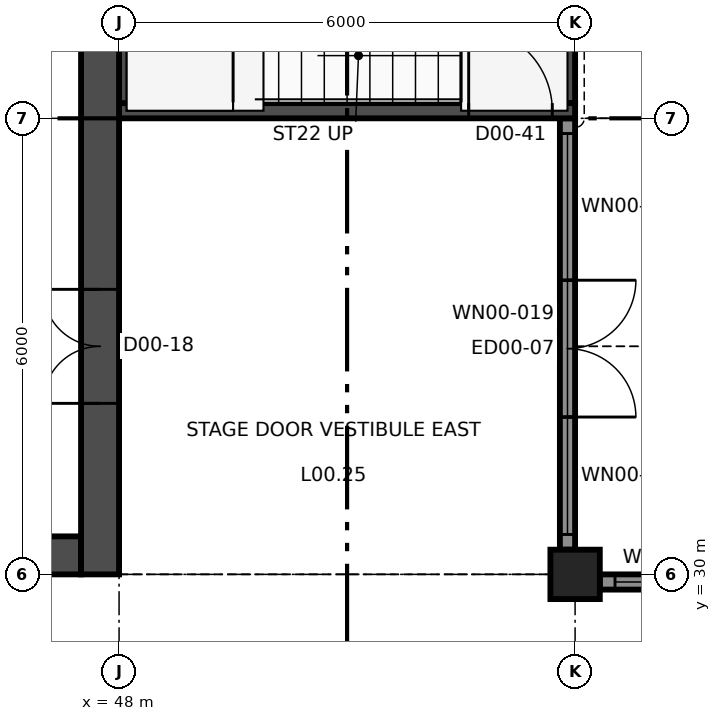
"""IFC4 building model, lengths in metres.
Left out: names, types, materials, properties, quantities, classifications, styles, units other than length and angle.
Written with IfcOpenShell. Run it as: python <this file> out.ifc"""

import sys

from ifc_helpers import new_model, si_unit, direction, frame, frame_2d, origin, origin_2d, place, context, subcontext, project, spatial, rectangle, extrude, element, fill, save


model = new_model("IFC4")
c1 = context("Model", 3, precision=1e-05, world=origin(), true_north=direction((0.0, 1.0)))
c2 = subcontext(c1, "Body", "Model", "MODEL_VIEW")
j1 = project(units=[si_unit("LENGTHUNIT", "METRE"), si_unit("PLANEANGLEUNIT", "RADIAN")], contexts=[c1])
p1 = place(None, origin())
s1 = spatial("IfcSite", under=j1, at=p1, CompositionType="ELEMENT")
p2 = place(p1, origin())
s2 = spatial("IfcBuilding", under=s1, at=p2, CompositionType="ELEMENT")
p3 = place(p2, origin())
s3 = spatial("IfcBuildingStorey", under=s2, at=p3, CompositionType="ELEMENT", Elevation=0.0)
p4 = place(p3, frame((54.0, 30.0, -0.3), z_axis=(0.0, 0.0, 1.0), x_axis=(1.0, 0.0, 0.0)))
e1 = element("IfcColumn", 1, at=p4, inside=s3, PredefinedType="COLUMN", context=c2, shape_type="SweptSolid", body=[
    extrude(rectangle(XDim=0.65, YDim=0.65, at=origin_2d()), origin(), (0.0, 0.0, 1.0), 7.3),
])
p5 = place(p3, frame((48.0, 36.1, -0.3), z_axis=(0.0, 0.0, 1.0), x_axis=(1.0, 0.0, 0.0)))
e2 = element("IfcWall", 2, at=p5, inside=s3, PredefinedType="SHEAR", context=c2, shape_type="SweptSolid", body=[
    extrude(rectangle(XDim=6.0, YDim=0.2, at=frame_2d((3.0, 0.0))), origin(), (0.0, 0.0, 1.0), 7.3),
])
p6 = place(p5, frame((4.6, 0.0, 0.3)))
e3 = element("IfcOpeningElement", 3, at=p6, cuts=e2, PredefinedType="OPENING", context=c2, shape_type="SweptSolid", body=[
    extrude(rectangle(XDim=1.1, YDim=2.2, at=frame_2d((0.55, 1.1))), frame((0.0, 0.11, 0.0), z_axis=(0.0, -1.0, 0.0), x_axis=(1.0, 0.0, 0.0)), (0.0, 0.0, 1.0), 0.22),
])
p7 = place(p3, frame((48.1, 36.2, -0.3), z_axis=(0.0, 0.0, 1.0), x_axis=(0.0, 1.0, 0.0)))
e4 = element("IfcWall", 4, at=p7, inside=s3, PredefinedType="SHEAR", context=c2, shape_type="SweptSolid", body=[
    extrude(rectangle(XDim=5.6, YDim=0.2, at=frame_2d((2.8, 0.0))), origin(), (0.0, 0.0, 1.0), 7.3),
])
p8 = place(p3, frame((53.9, 36.2, -0.3), z_axis=(0.0, 0.0, 1.0), x_axis=(0.0, 1.0, 0.0)))
e5 = element("IfcWall", 5, at=p8, inside=s3, PredefinedType="SHEAR", context=c2, shape_type="SweptSolid", body=[
    extrude(rectangle(XDim=5.6, YDim=0.2, at=frame_2d((2.8, 0.0))), origin(), (0.0, 0.0, 1.0), 7.3),
])
p9 = place(p8, frame((1.9, 0.0, 0.3)))
e6 = element("IfcOpeningElement", 6, at=p9, cuts=e5, PredefinedType="OPENING", context=c2, shape_type="SweptSolid", body=[
    extrude(rectangle(XDim=1.8, YDim=2.4, at=frame_2d((0.9, 1.2))), frame((0.0, 0.11, 0.0), z_axis=(0.0, -1.0, 0.0), x_axis=(1.0, 0.0, 0.0)), (0.0, 0.0, 1.0), 0.22),
])
p10 = place(p3, frame((47.75, 30.0, -0.3), z_axis=(0.0, 0.0, 1.0), x_axis=(0.0, 1.0, 0.0)))
e7 = element("IfcWall", 7, at=p10, inside=s3, PredefinedType="SHEAR", context=c2, shape_type="SweptSolid", body=[
    extrude(rectangle(XDim=24.0, YDim=0.5, at=frame_2d((12.0, 0.0))), origin(), (0.0, 0.0, 1.0), 7.3),
])
p11 = place(p10, frame((2.25, 0.0, 0.3)))
e8 = element("IfcOpeningElement", 8, at=p11, cuts=e7, PredefinedType="OPENING", context=c2, shape_type="SweptSolid", body=[
    extrude(rectangle(XDim=1.5, YDim=2.1, at=frame_2d((0.75, 1.05))), frame((0.0, 0.26, 0.0), z_axis=(0.0, -1.0, 0.0), x_axis=(1.0, 0.0, 0.0)), (0.0, 0.0, 1.0), 0.52),
])
p12 = place(p10, frame((22.3, 0.0, 0.3)))
e9 = element("IfcOpeningElement", 9, at=p12, cuts=e7, PredefinedType="OPENING", context=c2, shape_type="SweptSolid", body=[
    extrude(rectangle(XDim=1.0, YDim=2.1, at=frame_2d((0.5, 1.05))), frame((0.0, 0.26, 0.0), z_axis=(0.0, -1.0, 0.0), x_axis=(1.0, 0.0, 0.0)), (0.0, 0.0, 1.0), 0.52),
])
p13 = place(p3, frame((18.5, 30.25, -0.3), z_axis=(0.0, 0.0, 1.0), x_axis=(1.0, 0.0, 0.0)))
e10 = element("IfcWall", 10, at=p13, inside=s3, PredefinedType="SHEAR", context=c2, shape_type="SweptSolid", body=[
    extrude(rectangle(XDim=29.0, YDim=0.5, at=frame_2d((14.5, 0.0))), origin(), (0.0, 0.0, 1.0), 7.3),
])
p14 = place(p3, frame((53.9, 36.0, 0.0), z_axis=(0.0, 0.0, 1.0), x_axis=(0.0, -1.0, 0.0)))
e11 = element("IfcWall", 11, at=p14, inside=s3, PredefinedType="SOLIDWALL", context=c2, shape_type="SweptSolid", body=[
    extrude(rectangle(XDim=5.675, YDim=0.2, at=frame_2d((2.837, 0.0))), origin(), (0.0, 0.0, 1.0), 6.05),
])
p15 = place(p14, frame((2.13, 0.0, 0.0)))
e12 = element("IfcOpeningElement", 12, at=p15, cuts=e11, PredefinedType="OPENING", context=c2, shape_type="SweptSolid", body=[
    extrude(rectangle(XDim=1.8, YDim=2.4, at=frame_2d((0.9, 1.2))), frame((0.0, 0.11, 0.0), z_axis=(0.0, -1.0, 0.0), x_axis=(1.0, 0.0, 0.0)), (0.0, 0.0, 1.0), 0.22),
])
p16 = place(p14, frame((2.13, 0.0, 2.5)))
e13 = element("IfcOpeningElement", 13, at=p16, cuts=e11, PredefinedType="OPENING", context=c2, shape_type="SweptSolid", body=[
    extrude(rectangle(XDim=1.8, YDim=3.2, at=frame_2d((0.9, 1.6))), frame((0.0, 0.11, 0.0), z_axis=(0.0, -1.0, 0.0), x_axis=(1.0, 0.0, 0.0)), (0.0, 0.0, 1.0), 0.22),
])
p17 = place(p14, frame((0.2, 0.0, 0.1)))
e14 = element("IfcOpeningElement", 14, at=p17, cuts=e11, PredefinedType="OPENING", context=c2, shape_type="SweptSolid", body=[
    extrude(rectangle(XDim=1.93, YDim=5.6, at=frame_2d((0.965, 2.8))), frame((0.0, 0.11, 0.0), z_axis=(0.0, -1.0, 0.0), x_axis=(1.0, 0.0, 0.0)), (0.0, 0.0, 1.0), 0.22),
])
p18 = place(p14, frame((3.93, 0.0, 0.1)))
e15 = element("IfcOpeningElement", 15, at=p18, cuts=e11, PredefinedType="OPENING", context=c2, shape_type="SweptSolid", body=[
    extrude(rectangle(XDim=1.545, YDim=5.6, at=frame_2d((0.772, 2.8))), frame((0.0, 0.11, 0.0), z_axis=(0.0, -1.0, 0.0), x_axis=(1.0, 0.0, 0.0)), (0.0, 0.0, 1.0), 0.22),
])
p19 = place(p3, frame((54.325, 29.9, 0.0), z_axis=(0.0, 0.0, 1.0), x_axis=(1.0, 0.0, 0.0)))
e16 = element("IfcWall", 16, at=p19, inside=s3, PredefinedType="SOLIDWALL", context=c2, shape_type="SweptSolid", body=[
    extrude(rectangle(XDim=5.675, YDim=0.2, at=frame_2d((2.837, 0.0))), origin(), (0.0, 0.0, 1.0), 6.05),
])
p20 = place(p19, frame((1.745, 0.0, 0.0)))
e17 = element("IfcOpeningElement", 17, at=p20, cuts=e16, PredefinedType="OPENING", context=c2, shape_type="SweptSolid", body=[
    extrude(rectangle(XDim=1.8, YDim=2.4, at=frame_2d((0.9, 1.2))), frame((0.0, 0.11, 0.0), z_axis=(0.0, -1.0, 0.0), x_axis=(1.0, 0.0, 0.0)), (0.0, 0.0, 1.0), 0.22),
])
p21 = place(p19, frame((1.745, 0.0, 2.5)))
e18 = element("IfcOpeningElement", 18, at=p21, cuts=e16, PredefinedType="OPENING", context=c2, shape_type="SweptSolid", body=[
    extrude(rectangle(XDim=1.8, YDim=3.2, at=frame_2d((0.9, 1.6))), frame((0.0, 0.11, 0.0), z_axis=(0.0, -1.0, 0.0), x_axis=(1.0, 0.0, 0.0)), (0.0, 0.0, 1.0), 0.22),
])
p22 = place(p19, frame((0.2, 0.0, 0.1)))
e19 = element("IfcOpeningElement", 19, at=p22, cuts=e16, PredefinedType="OPENING", context=c2, shape_type="SweptSolid", body=[
    extrude(rectangle(XDim=1.545, YDim=5.6, at=frame_2d((0.772, 2.8))), frame((0.0, 0.11, 0.0), z_axis=(0.0, -1.0, 0.0), x_axis=(1.0, 0.0, 0.0)), (0.0, 0.0, 1.0), 0.22),
])
p23 = place(p19, frame((3.545, 0.0, 0.1)))
e20 = element("IfcOpeningElement", 20, at=p23, cuts=e16, PredefinedType="OPENING", context=c2, shape_type="SweptSolid", body=[
    extrude(rectangle(XDim=1.93, YDim=5.6, at=frame_2d((0.965, 2.8))), frame((0.0, 0.11, 0.0), z_axis=(0.0, -1.0, 0.0), x_axis=(1.0, 0.0, 0.0)), (0.0, 0.0, 1.0), 0.22),
])
p24 = place(p15, origin())
e21 = element("IfcDoor", 21, at=p24, inside=s3, OperationType="DOUBLE_DOOR_SINGLE_SWING", PredefinedType="DOOR", context=c2, shape_type="SweptSolid", body=[
    extrude(rectangle(XDim=1.8, YDim=2.4, at=frame_2d((0.9, 1.2))), frame((0.0, 0.025, 0.0), z_axis=(0.0, -1.0, 0.0), x_axis=(1.0, 0.0, 0.0)), (0.0, 0.0, 1.0), 0.05),
])
fill(e12, e21)
p25 = place(p16, origin())
e22 = element("IfcWindow", 22, at=p25, inside=s3, PartitioningType="SINGLE_PANEL", PredefinedType="WINDOW", context=c2, shape_type="SweptSolid", body=[
    extrude(rectangle(XDim=1.8, YDim=3.2, at=frame_2d((0.9, 1.6))), frame((0.0, 0.03, 0.0), z_axis=(0.0, -1.0, 0.0), x_axis=(1.0, 0.0, 0.0)), (0.0, 0.0, 1.0), 0.06),
])
fill(e13, e22)
p26 = place(p17, origin())
e23 = element("IfcWindow", 23, at=p26, inside=s3, PartitioningType="SINGLE_PANEL", PredefinedType="WINDOW", context=c2, shape_type="SweptSolid", body=[
    extrude(rectangle(XDim=1.93, YDim=5.6, at=frame_2d((0.965, 2.8))), frame((0.0, 0.03, 0.0), z_axis=(0.0, -1.0, 0.0), x_axis=(1.0, 0.0, 0.0)), (0.0, 0.0, 1.0), 0.06),
])
fill(e14, e23)
p27 = place(p18, origin())
e24 = element("IfcWindow", 24, at=p27, inside=s3, PartitioningType="SINGLE_PANEL", PredefinedType="WINDOW", context=c2, shape_type="SweptSolid", body=[
    extrude(rectangle(XDim=1.545, YDim=5.6, at=frame_2d((0.772, 2.8))), frame((0.0, 0.03, 0.0), z_axis=(0.0, -1.0, 0.0), x_axis=(1.0, 0.0, 0.0)), (0.0, 0.0, 1.0), 0.06),
])
fill(e15, e24)
p28 = place(p22, origin())
e25 = element("IfcWindow", 25, at=p28, inside=s3, PartitioningType="SINGLE_PANEL", PredefinedType="WINDOW", context=c2, shape_type="SweptSolid", body=[
    extrude(rectangle(XDim=1.545, YDim=5.6, at=frame_2d((0.772, 2.8))), frame((0.0, 0.03, 0.0), z_axis=(0.0, -1.0, 0.0), x_axis=(1.0, 0.0, 0.0)), (0.0, 0.0, 1.0), 0.06),
])
fill(e19, e25)
p29 = place(p11, frame((1.5, 0.0, 0.0), z_axis=(0.0, 0.0, 1.0), x_axis=(-1.0, 0.0, 0.0)))
e26 = element("IfcDoor", 26, at=p29, inside=s3, OperationType="DOUBLE_DOOR_SINGLE_SWING", PredefinedType="DOOR", context=c2, shape_type="SweptSolid", body=[
    extrude(rectangle(XDim=1.5, YDim=2.1, at=frame_2d((0.75, 1.05))), frame((0.0, 0.025, 0.0), z_axis=(0.0, -1.0, 0.0), x_axis=(1.0, 0.0, 0.0)), (0.0, 0.0, 1.0), 0.05),
])
fill(e8, e26)
p30 = place(p6, origin())
e27 = element("IfcDoor", 27, at=p30, inside=s3, OperationType="SINGLE_SWING_LEFT", PredefinedType="DOOR", context=c2, shape_type="SweptSolid", body=[
    extrude(rectangle(XDim=1.1, YDim=2.2, at=frame_2d((0.55, 1.1))), frame((0.0, 0.025, 0.0), z_axis=(0.0, -1.0, 0.0), x_axis=(1.0, 0.0, 0.0)), (0.0, 0.0, 1.0), 0.05),
])
fill(e3, e27)
save(model, sys.argv[1])
